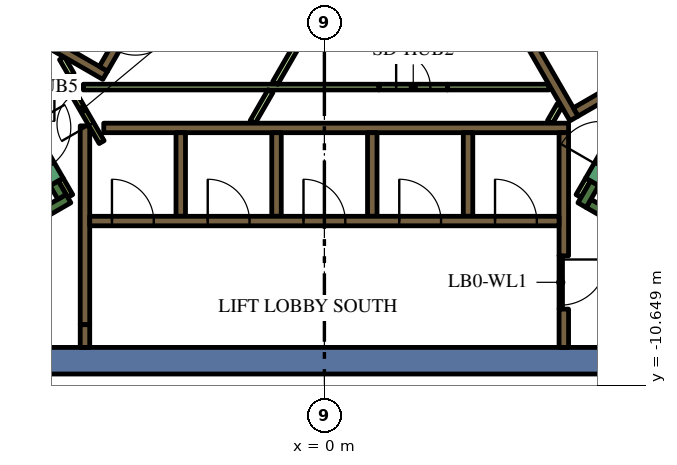
"""IFC4 building model, lengths in metres.
Left out: names, types, materials, properties, quantities, classifications, styles, units other than length and angle.
Written with IfcOpenShell. Run it as: python <this file> out.ifc"""

import sys

from ifc_helpers import new_model, si_unit, direction, frame, frame_2d, origin, place, context, subcontext, project, spatial, polyline, rectangle, outline, extrude, element, fill, save


model = new_model("IFC4")
c1 = context("Model", 3, precision=1e-05, world=origin(), true_north=direction((0.0, 1.0)))
c2 = subcontext(c1, "Body", "Model", "MODEL_VIEW")
j1 = project(units=[si_unit("LENGTHUNIT", "METRE"), si_unit("PLANEANGLEUNIT", "RADIAN")], contexts=[c1])
p1 = place(None, origin())
s1 = spatial("IfcSite", under=j1, at=p1, CompositionType="ELEMENT")
p2 = place(p1, origin())
s2 = spatial("IfcBuilding", under=s1, at=p2, CompositionType="ELEMENT")
p3 = place(p2, frame((0.0, 0.0, 205.8)))
s3 = spatial("IfcBuildingStorey", under=s2, at=p3, CompositionType="ELEMENT", Elevation=205.8)
p4 = place(p3, frame((-10.556, -10.0, 0.0), z_axis=(0.0, 0.0, 1.0), x_axis=(1.0, 0.0, 0.0)))
e1 = element("IfcWall", 1, at=p4, inside=s3, PredefinedType="SOLIDWALL", context=c2, shape_type="SweptSolid", body=[
    extrude(rectangle(XDim=19.461, YDim=0.7, at=frame_2d((9.73, 0.0))), origin(), (0.0, 0.0, 1.0), 4.2),
])
p5 = place(p3, frame((12.84, -9.261, 0.0), z_axis=(0.0, 0.0, 1.0), x_axis=(-0.866013990052, 0.500019768644, 0.0)))
e2 = element("IfcWall", 2, at=p5, inside=s3, PredefinedType="SOLIDWALL", context=c2, shape_type="SweptSolid", body=[
    extrude(rectangle(XDim=6.8, YDim=0.25, at=frame_2d((3.4, 0.0))), origin(), (0.0, 0.0, 1.0), 4.2),
])
p6 = place(p3, frame((7.113, -5.33, 0.0), z_axis=(0.0, 0.0, 1.0), x_axis=(-0.499965889992, -0.866045096311, 0.0)))
e3 = element("IfcWall", 3, at=p6, inside=s3, PredefinedType="SOLIDWALL", context=c2, shape_type="SweptSolid", body=[
    extrude(rectangle(XDim=0.666, YDim=0.25, at=frame_2d((0.333, 0.0))), origin(), (0.0, 0.0, 1.0), 4.2),
])
p7 = place(p3, frame((-12.84, -9.261, 0.0), z_axis=(0.0, 0.0, 1.0), x_axis=(0.866016039709, 0.500016218704, 0.0)))
e4 = element("IfcWall", 4, at=p7, inside=s3, PredefinedType="SOLIDWALL", context=c2, shape_type="SweptSolid", body=[
    extrude(rectangle(XDim=7.05, YDim=0.25, at=frame_2d((3.525, 0.0))), origin(), (0.0, 0.0, 1.0), 4.2),
])
p8 = place(p3, frame((-6.905, -5.69, 0.0), z_axis=(0.0, 0.0, 1.0), x_axis=(-0.499993700073, 0.866029041019, 0.0)))
e5 = element("IfcWall", 5, at=p8, inside=s3, PredefinedType="SOLIDWALL", context=c2, shape_type="SweptSolid", body=[
    extrude(rectangle(XDim=0.416, YDim=0.25, at=frame_2d((0.208, 0.0))), origin(), (0.0, 0.0, 1.0), 4.2),
])
p9 = place(p3, frame((-6.3, -9.05, 0.0), z_axis=(0.0, 0.0, 1.0), x_axis=(0.0, 1.0, 0.0)))
e6 = element("IfcWall", 6, at=p9, inside=s3, PredefinedType="SOLIDWALL", context=c2, shape_type="SweptSolid", body=[
    extrude(rectangle(XDim=5.23, YDim=0.25, at=frame_2d((2.615, 0.0))), origin(), (0.0, 0.0, 1.0), 4.2),
])
p10 = place(p3, frame((-6.3, -9.052, 0.0), z_axis=(0.0, 0.0, 1.0), x_axis=(0.0, -1.0, 0.0)))
e7 = element("IfcWall", 7, at=p10, inside=s3, PredefinedType="SOLIDWALL", context=c2, shape_type="SweptSolid", body=[
    extrude(rectangle(XDim=0.598, YDim=0.25, at=frame_2d((0.299, 0.0))), origin(), (0.0, 0.0, 1.0), 4.2),
])
p11 = place(p3, frame((-5.806, -3.875, 0.0), z_axis=(0.0, 0.0, 1.0), x_axis=(1.0, 0.0, 0.0)))
e8 = element("IfcWall", 8, at=p11, inside=s3, PredefinedType="SOLIDWALL", context=c2, shape_type="SweptSolid", body=[
    extrude(rectangle(XDim=12.231, YDim=0.25, at=frame_2d((6.116, 0.0))), origin(), (0.0, 0.0, 1.0), 4.2),
])
p12 = place(p3, frame((6.3, -7.24, 0.0), z_axis=(0.0, 0.0, 1.0), x_axis=(0.0, 1.0, 0.0)))
e9 = element("IfcWall", 9, at=p12, inside=s3, PredefinedType="SOLIDWALL", context=c2, shape_type="SweptSolid", body=[
    extrude(rectangle(XDim=3.24, YDim=0.25, at=frame_2d((1.62, 0.0))), origin(), (0.0, 0.0, 1.0), 4.2),
])
p13 = place(p3, frame((6.3, -9.65, 0.0), z_axis=(0.0, 0.0, 1.0), x_axis=(0.0, 1.0, 0.0)))
e10 = element("IfcWall", 10, at=p13, inside=s3, PredefinedType="SOLIDWALL", context=c2, shape_type="SweptSolid", body=[
    extrude(rectangle(XDim=1.008, YDim=0.25, at=frame_2d((0.504, 0.0))), origin(), (0.0, 0.0, 1.0), 4.2),
])
for number, where, z_axis, x_axis in (
    (11, (3.78, -4.0, 0.0), (0.0, 0.0, 1.0), (0.0, -1.0, 0.0)),
    (12, (1.26, -4.0, 0.0), (0.0, 0.0, 1.0), (0.0, -1.0, 0.0)),
    (13, (-1.26, -4.0, 0.0), (0.0, 0.0, 1.0), (0.0, -1.0, 0.0)),
    (14, (-3.78, -4.0, 0.0), (0.0, 0.0, 1.0), (0.0, -1.0, 0.0)),
):
    element("IfcWall", number, at=place(p3, frame(where, z_axis=z_axis, x_axis=x_axis)), inside=s3, PredefinedType="SOLIDWALL", context=c2, shape_type="SweptSolid", body=[
        extrude(rectangle(XDim=2.2, YDim=0.25, at=frame_2d((1.1, 0.0))), origin(), (0.0, 0.0, 1.0), 4.2),
    ])
p14 = place(p3, origin())
e15 = element("IfcWall", 15, at=p14, inside=s3, PredefinedType="SOLIDWALL", context=c2, shape_type="SweptSolid", body=[
    extrude(outline(polyline([(0.332, 6.925), (0.335, 6.925), (0.335, 6.925), (0.335, 6.925), (0.335, 7.075), (0.335, 7.075), (0.335, 7.075), (0.245, 7.075), (0.035, 7.439), (0.252, 7.564), (0.377, 7.348), (1.512, 5.382), (1.637, 5.165), (2.221, 4.153), (2.771, 3.199), (2.896, 2.983), (3.138, 2.564), (4.031, 1.017), (4.156, 0.801), (5.292, -1.165), (5.417, -1.382), (6.073, -2.519), (6.552, -3.348), (6.677, -3.564), (6.46, -3.689), (0.332, 6.925)])), origin(), (0.0, 0.0, 1.0), 4.2),
])
p15 = place(p3, frame((11.507, -0.631, 0.0), z_axis=(0.0, 0.0, 1.0), x_axis=(-0.866011447264, -0.500024172624, 0.0)))
e16 = element("IfcWall", 16, at=p15, inside=s3, PredefinedType="SOLIDWALL", context=c2, shape_type="SweptSolid", body=[
    extrude(rectangle(XDim=5.65, YDim=0.25, at=frame_2d((2.825, 0.0))), origin(), (0.0, 0.0, 1.0), 4.2),
])
p16 = place(p3, frame((-7.889, -1.265, 0.0), z_axis=(0.0, 0.0, 1.0), x_axis=(0.866057815567, -0.499943856944, 0.0)))
e17 = element("IfcWall", 17, at=p16, inside=s3, PredefinedType="SOLIDWALL", context=c2, shape_type="SweptSolid", body=[
    extrude(rectangle(XDim=2.45, YDim=0.25, at=frame_2d((1.225, 0.0))), origin(), (0.0, 0.0, 1.0), 4.2),
])
p17 = place(p3, frame((1.438, -2.8, 0.0), z_axis=(0.0, 0.0, 1.0), x_axis=(-1.0, 0.0, 0.0)))
e18 = element("IfcWall", 18, at=p17, inside=s3, PredefinedType="PARTITIONING", context=c2, shape_type="SweptSolid", body=[
    extrude(rectangle(XDim=7.781, YDim=0.15, at=frame_2d((3.891, 0.0))), origin(), (0.0, 0.0, 1.0), 3.45),
])
p18 = place(p3, frame((-1.418, -2.907, 0.0), z_axis=(0.0, 0.0, 1.0), x_axis=(-0.499978056798, -0.866038072327, 0.0)))
e19 = element("IfcWall", 19, at=p18, inside=s3, PredefinedType="PARTITIONING", context=c2, shape_type="SweptSolid", body=[
    extrude(rectangle(XDim=0.937, YDim=0.15, at=frame_2d((0.469, 0.0))), origin(), (0.0, 0.0, 1.0), 3.45),
])
for number, where, z_axis, x_axis in (
    (20, (-1.295, -2.693, 0.0), (0.0, 0.0, 1.0), (0.5, 0.866, 0.0)),
    (21, (3.238, -2.8, 0.0), (0.0, 0.0, 1.0), (1.0, 0.0, 0.0)),
):
    element("IfcWall", number, at=place(p3, frame(where, z_axis=z_axis, x_axis=x_axis)), inside=s3, PredefinedType="PARTITIONING", context=c2, shape_type="SweptSolid", body=[
        extrude(rectangle(XDim=2.672, YDim=0.15, at=frame_2d((1.336, 0.0))), origin(), (0.0, 0.0, 1.0), 3.45),
    ])
p19 = place(p3, frame((-6.653, -2.477, 0.0), z_axis=(0.0, 0.0, 1.0), x_axis=(-0.500002592159, 0.866023907196, 0.0)))
e22 = element("IfcWall", 22, at=p19, inside=s3, PredefinedType="PARTITIONING", context=c2, shape_type="SweptSolid", body=[
    extrude(rectangle(XDim=0.503, YDim=0.15, at=frame_2d((0.251, 0.0))), origin(), (0.0, 0.0, 1.0), 3.45),
])
p20 = place(p3, frame((-6.94, -5.23, 0.0), z_axis=(0.0, 0.0, 1.0), x_axis=(0.499834152157, -0.86612113491, 0.0)))
e23 = element("IfcWall", 23, at=p20, inside=s3, PredefinedType="PARTITIONING", context=c2, shape_type="SweptSolid", body=[
    extrude(rectangle(XDim=0.505, YDim=0.15, at=frame_2d((0.252, 0.0))), origin(), (0.0, 0.0, 1.0), 4.2),
])
p21 = place(p3, frame((6.688, -5.667, 0.0), z_axis=(0.0, 0.0, 1.0), x_axis=(0.499834152157, 0.86612113491, 0.0)))
e24 = element("IfcWall", 24, at=p21, inside=s3, PredefinedType="PARTITIONING", context=c2, shape_type="SweptSolid", body=[
    extrude(rectangle(XDim=0.505, YDim=0.15, at=frame_2d((0.252, 0.0))), origin(), (0.0, 0.0, 1.0), 3.45),
])
p22 = place(p3, frame((5.936, -3.718, 0.0), z_axis=(0.0, 0.0, 1.0), x_axis=(0.499890179513, 0.866088799389, 0.0)))
e25 = element("IfcWall", 25, at=p22, inside=s3, PredefinedType="PARTITIONING", context=c2, shape_type="SweptSolid", body=[
    extrude(rectangle(XDim=0.504, YDim=0.15, at=frame_2d((0.252, 0.0))), origin(), (0.0, 0.0, 1.0), 3.45),
])
p23 = place(p3, frame((-6.175, -6.325, 0.0), z_axis=(0.0, 0.0, 1.0), x_axis=(1.0, 0.0, 0.0)))
e26 = element("IfcWall", 26, at=p23, inside=s3, PredefinedType="SOLIDWALL", context=c2, shape_type="SweptSolid", body=[
    extrude(rectangle(XDim=12.35, YDim=0.25, at=frame_2d((6.175, 0.0))), origin(), (0.0, 0.0, 1.0), 4.2),
])
p24 = place(p23, frame((0.585, 0.0, 0.0)))
e27 = element("IfcOpeningElement", 27, at=p24, cuts=e26, PredefinedType="OPENING", context=c2, shape_type="SweptSolid", body=[
    extrude(rectangle(XDim=1.1, YDim=2.1, at=frame_2d((0.55, 1.05))), frame((0.0, 0.135, 0.0), z_axis=(0.0, -1.0, 0.0), x_axis=(1.0, 0.0, 0.0)), (0.0, 0.0, 1.0), 0.27),
])
p25 = place(p23, frame((3.105, 0.0, 0.0)))
e28 = element("IfcOpeningElement", 28, at=p25, cuts=e26, PredefinedType="OPENING", context=c2, shape_type="SweptSolid", body=[
    extrude(rectangle(XDim=1.1, YDim=2.1, at=frame_2d((0.55, 1.05))), frame((0.0, 0.135, 0.0), z_axis=(0.0, -1.0, 0.0), x_axis=(1.0, 0.0, 0.0)), (0.0, 0.0, 1.0), 0.27),
])
p26 = place(p23, frame((5.625, 0.0, 0.0)))
e29 = element("IfcOpeningElement", 29, at=p26, cuts=e26, PredefinedType="OPENING", context=c2, shape_type="SweptSolid", body=[
    extrude(rectangle(XDim=1.1, YDim=2.1, at=frame_2d((0.55, 1.05))), frame((0.0, 0.135, 0.0), z_axis=(0.0, -1.0, 0.0), x_axis=(1.0, 0.0, 0.0)), (0.0, 0.0, 1.0), 0.27),
])
p27 = place(p23, frame((8.145, 0.0, 0.0)))
e30 = element("IfcOpeningElement", 30, at=p27, cuts=e26, PredefinedType="OPENING", context=c2, shape_type="SweptSolid", body=[
    extrude(rectangle(XDim=1.1, YDim=2.1, at=frame_2d((0.55, 1.05))), frame((0.0, 0.135, 0.0), z_axis=(0.0, -1.0, 0.0), x_axis=(1.0, 0.0, 0.0)), (0.0, 0.0, 1.0), 0.27),
])
p28 = place(p23, frame((10.665, 0.0, 0.0)))
e31 = element("IfcOpeningElement", 31, at=p28, cuts=e26, PredefinedType="OPENING", context=c2, shape_type="SweptSolid", body=[
    extrude(rectangle(XDim=1.1, YDim=2.1, at=frame_2d((0.55, 1.05))), frame((0.0, 0.135, 0.0), z_axis=(0.0, -1.0, 0.0), x_axis=(1.0, 0.0, 0.0)), (0.0, 0.0, 1.0), 0.27),
])
p29 = place(p3, frame((8.565, -2.185, 0.0), z_axis=(0.0, 0.0, 1.0), x_axis=(-0.499997954832, 0.866026584559, 0.0)))
e32 = element("IfcWall", 32, at=p29, inside=s3, PredefinedType="SOLIDWALL", context=c2, shape_type="SweptSolid", body=[
    extrude(rectangle(XDim=12.35, YDim=0.25, at=frame_2d((6.175, 0.0))), origin(), (0.0, 0.0, 1.0), 4.2),
])
p30 = place(p29, frame((0.585, 0.0, 0.0)))
e33 = element("IfcOpeningElement", 33, at=p30, cuts=e32, PredefinedType="OPENING", context=c2, shape_type="SweptSolid", body=[
    extrude(rectangle(XDim=1.1, YDim=2.1, at=frame_2d((0.55, 1.05))), frame((0.0, 0.135, 0.0), z_axis=(0.0, -1.0, 0.0), x_axis=(1.0, 0.0, 0.0)), (0.0, 0.0, 1.0), 0.27),
])
p31 = place(p3, frame((-0.898, 6.194, 0.0), z_axis=(0.0, 0.0, 1.0), x_axis=(-0.499996202215, -0.866027596426, 0.0)))
e34 = element("IfcWall", 34, at=p31, inside=s3, PredefinedType="SOLIDWALL", context=c2, shape_type="SweptSolid", body=[
    extrude(rectangle(XDim=9.83, YDim=0.25, at=frame_2d((4.915, 0.0))), origin(), (0.0, 0.0, 1.0), 4.2),
])
p32 = place(p31, frame((0.585, 0.0, 0.0)))
e35 = element("IfcOpeningElement", 35, at=p32, cuts=e34, PredefinedType="OPENING", context=c2, shape_type="SweptSolid", body=[
    extrude(rectangle(XDim=1.1, YDim=2.1, at=frame_2d((0.55, 1.05))), frame((0.0, 0.135, 0.0), z_axis=(0.0, -1.0, 0.0), x_axis=(1.0, 0.0, 0.0)), (0.0, 0.0, 1.0), 0.27),
])
p33 = place(p31, frame((3.105, 0.0, 0.0)))
e36 = element("IfcOpeningElement", 36, at=p33, cuts=e34, PredefinedType="OPENING", context=c2, shape_type="SweptSolid", body=[
    extrude(rectangle(XDim=1.1, YDim=2.1, at=frame_2d((0.55, 1.05))), frame((0.0, 0.135, 0.0), z_axis=(0.0, -1.0, 0.0), x_axis=(1.0, 0.0, 0.0)), (0.0, 0.0, 1.0), 0.27),
])
p34 = place(p31, frame((5.625, 0.0, 0.0)))
e37 = element("IfcOpeningElement", 37, at=p34, cuts=e34, PredefinedType="OPENING", context=c2, shape_type="SweptSolid", body=[
    extrude(rectangle(XDim=1.1, YDim=2.1, at=frame_2d((0.55, 1.05))), frame((0.0, 0.135, 0.0), z_axis=(0.0, -1.0, 0.0), x_axis=(1.0, 0.0, 0.0)), (0.0, 0.0, 1.0), 0.27),
])
p35 = place(p31, frame((8.145, 0.0, 0.0)))
e38 = element("IfcOpeningElement", 38, at=p35, cuts=e34, PredefinedType="OPENING", context=c2, shape_type="SweptSolid", body=[
    extrude(rectangle(XDim=1.1, YDim=2.1, at=frame_2d((0.55, 1.05))), frame((0.0, 0.135, 0.0), z_axis=(0.0, -1.0, 0.0), x_axis=(1.0, 0.0, 0.0)), (0.0, 0.0, 1.0), 0.27),
])
p36 = place(p3, frame((7.048, -5.292, 0.0), z_axis=(0.0, 0.0, 1.0), x_axis=(0.49994051562, 0.866059744384, 0.0)))
e39 = element("IfcWall", 39, at=p36, inside=s3, PredefinedType="SOLIDWALL", context=c2, shape_type="SweptSolid", body=[
    extrude(rectangle(XDim=2.1, YDim=0.4, at=frame_2d((1.05, 0.0))), origin(), (0.0, 0.0, 1.0), 4.2),
])
p37 = place(p36, frame((0.45, 0.0, 0.0)))
e40 = element("IfcOpeningElement", 40, at=p37, cuts=e39, PredefinedType="OPENING", context=c2, shape_type="SweptSolid", body=[
    extrude(rectangle(XDim=1.2, YDim=2.1, at=frame_2d((0.6, 1.05))), frame((0.0, 0.21, 0.0), z_axis=(0.0, -1.0, 0.0), x_axis=(1.0, 0.0, 0.0)), (0.0, 0.0, 1.0), 0.42),
])
p38 = place(p3, frame((-8.098, -3.474, 0.0), z_axis=(0.0, 0.0, 1.0), x_axis=(0.49994051562, -0.866059744384, 0.0)))
e41 = element("IfcWall", 41, at=p38, inside=s3, PredefinedType="SOLIDWALL", context=c2, shape_type="SweptSolid", body=[
    extrude(rectangle(XDim=2.1, YDim=0.4, at=frame_2d((1.05, 0.0))), origin(), (0.0, 0.0, 1.0), 4.2),
])
p39 = place(p38, frame((0.45, 0.0, 0.0)))
e42 = element("IfcOpeningElement", 42, at=p39, cuts=e41, PredefinedType="OPENING", context=c2, shape_type="SweptSolid", body=[
    extrude(rectangle(XDim=1.2, YDim=2.1, at=frame_2d((0.6, 1.05))), frame((0.0, 0.21, 0.0), z_axis=(0.0, -1.0, 0.0), x_axis=(1.0, 0.0, 0.0)), (0.0, 0.0, 1.0), 0.42),
])
p40 = place(p3, frame((-5.861, -4.248, 0.0), z_axis=(0.0, 0.0, 1.0), x_axis=(-0.500043646338, 0.866000203093, 0.0)))
e43 = element("IfcWall", 43, at=p40, inside=s3, PredefinedType="PARTITIONING", context=c2, shape_type="SweptSolid", body=[
    extrude(rectangle(XDim=1.93, YDim=0.15, at=frame_2d((0.965, 0.0))), origin(), (0.0, 0.0, 1.0), 4.2),
])
p41 = place(p40, frame((0.55, 0.0, 0.0)))
e44 = element("IfcOpeningElement", 44, at=p41, cuts=e43, PredefinedType="OPENING", context=c2, shape_type="SweptSolid", body=[
    extrude(rectangle(XDim=0.9, YDim=2.1, at=frame_2d((0.45, 1.05))), frame((0.0, 0.085, 0.0), z_axis=(0.0, -1.0, 0.0), x_axis=(1.0, 0.0, 0.0)), (0.0, 0.0, 1.0), 0.17),
])
p42 = place(p3, frame((6.22, -7.237, 0.0), z_axis=(0.0, 0.0, 1.0), x_axis=(0.0, -1.0, 0.0)))
e45 = element("IfcWall", 45, at=p42, inside=s3, PredefinedType="PARTITIONING", context=c2, shape_type="SweptSolid", body=[
    extrude(rectangle(XDim=1.4, YDim=0.09, at=frame_2d((0.7, 0.0))), origin(), (0.0, 0.0, 1.0), 3.45),
])
p43 = place(p42, frame((0.1, 0.0, 0.0)))
e46 = element("IfcOpeningElement", 46, at=p43, cuts=e45, PredefinedType="OPENING", context=c2, shape_type="SweptSolid", body=[
    extrude(rectangle(XDim=1.2, YDim=2.1, at=frame_2d((0.6, 1.05))), frame((0.0, 0.055, 0.0), z_axis=(0.0, -1.0, 0.0), x_axis=(1.0, 0.0, 0.0)), (0.0, 0.0, 1.0), 0.11),
])
p44 = place(p3, frame((1.438, -2.8, 0.0), z_axis=(0.0, 0.0, 1.0), x_axis=(1.0, 0.0, 0.0)))
e47 = element("IfcWall", 47, at=p44, inside=s3, PredefinedType="PARTITIONING", context=c2, shape_type="SweptSolid", body=[
    extrude(rectangle(XDim=1.8, YDim=0.15, at=frame_2d((0.9, 0.0))), origin(), (0.0, 0.0, 1.0), 3.45),
])
p45 = place(p44, frame((0.45, 0.0, 0.0)))
e48 = element("IfcOpeningElement", 48, at=p45, cuts=e47, PredefinedType="OPENING", context=c2, shape_type="SweptSolid", body=[
    extrude(rectangle(XDim=0.9, YDim=2.1, at=frame_2d((0.45, 1.05))), frame((0.0, 0.085, 0.0), z_axis=(0.0, -1.0, 0.0), x_axis=(1.0, 0.0, 0.0)), (0.0, 0.0, 1.0), 0.17),
])
p46 = place(p3, frame((-6.655, -2.8, 0.0), z_axis=(0.0, 0.0, 1.0), x_axis=(-1.0, 0.0, 0.0)))
e49 = element("IfcWall", 49, at=p46, inside=s3, PredefinedType="PARTITIONING", context=c2, shape_type="SweptSolid", body=[
    extrude(rectangle(XDim=1.8, YDim=0.15, at=frame_2d((0.9, 0.0))), origin(), (0.0, 0.0, 1.0), 3.45),
])
p47 = place(p46, frame((0.45, 0.0, 0.0)))
e50 = element("IfcOpeningElement", 50, at=p47, cuts=e49, PredefinedType="OPENING", context=c2, shape_type="SweptSolid", body=[
    extrude(rectangle(XDim=0.9, YDim=2.1, at=frame_2d((0.45, 1.05))), frame((0.0, 0.085, 0.0), z_axis=(0.0, -1.0, 0.0), x_axis=(1.0, 0.0, 0.0)), (0.0, 0.0, 1.0), 0.17),
])
p48 = place(p24, origin())
e51 = element("IfcDoor", 51, at=p48, inside=s3, OperationType="DOUBLE_DOOR_SLIDING", PredefinedType="DOOR", context=c2, shape_type="SweptSolid", body=[
    extrude(rectangle(XDim=1.1, YDim=2.1, at=frame_2d((0.55, 1.05))), frame((0.0, 0.025, 0.0), z_axis=(0.0, -1.0, 0.0), x_axis=(1.0, 0.0, 0.0)), (0.0, 0.0, 1.0), 0.05),
])
fill(e27, e51)
p49 = place(p25, origin())
e52 = element("IfcDoor", 52, at=p49, inside=s3, OperationType="DOUBLE_DOOR_SLIDING", PredefinedType="DOOR", context=c2, shape_type="SweptSolid", body=[
    extrude(rectangle(XDim=1.1, YDim=2.1, at=frame_2d((0.55, 1.05))), frame((0.0, 0.025, 0.0), z_axis=(0.0, -1.0, 0.0), x_axis=(1.0, 0.0, 0.0)), (0.0, 0.0, 1.0), 0.05),
])
fill(e28, e52)
p50 = place(p26, origin())
e53 = element("IfcDoor", 53, at=p50, inside=s3, OperationType="DOUBLE_DOOR_SLIDING", PredefinedType="DOOR", context=c2, shape_type="SweptSolid", body=[
    extrude(rectangle(XDim=1.1, YDim=2.1, at=frame_2d((0.55, 1.05))), frame((0.0, 0.025, 0.0), z_axis=(0.0, -1.0, 0.0), x_axis=(1.0, 0.0, 0.0)), (0.0, 0.0, 1.0), 0.05),
])
fill(e29, e53)
p51 = place(p27, origin())
e54 = element("IfcDoor", 54, at=p51, inside=s3, OperationType="DOUBLE_DOOR_SLIDING", PredefinedType="DOOR", context=c2, shape_type="SweptSolid", body=[
    extrude(rectangle(XDim=1.1, YDim=2.1, at=frame_2d((0.55, 1.05))), frame((0.0, 0.025, 0.0), z_axis=(0.0, -1.0, 0.0), x_axis=(1.0, 0.0, 0.0)), (0.0, 0.0, 1.0), 0.05),
])
fill(e30, e54)
p52 = place(p28, origin())
e55 = element("IfcDoor", 55, at=p52, inside=s3, OperationType="DOUBLE_DOOR_SLIDING", PredefinedType="DOOR", context=c2, shape_type="SweptSolid", body=[
    extrude(rectangle(XDim=1.1, YDim=2.1, at=frame_2d((0.55, 1.05))), frame((0.0, 0.025, 0.0), z_axis=(0.0, -1.0, 0.0), x_axis=(1.0, 0.0, 0.0)), (0.0, 0.0, 1.0), 0.05),
])
fill(e31, e55)
p53 = place(p41, origin())
e56 = element("IfcDoor", 56, at=p53, inside=s3, OperationType="SINGLE_SWING_LEFT", PredefinedType="DOOR", context=c2, shape_type="SweptSolid", body=[
    extrude(rectangle(XDim=0.9, YDim=2.1, at=frame_2d((0.45, 1.05))), frame((0.0, 0.025, 0.0), z_axis=(0.0, -1.0, 0.0), x_axis=(1.0, 0.0, 0.0)), (0.0, 0.0, 1.0), 0.05),
])
fill(e44, e56)
p54 = place(p43, origin())
e57 = element("IfcDoor", 57, at=p54, inside=s3, OperationType="SINGLE_SWING_LEFT", PredefinedType="DOOR", context=c2, shape_type="SweptSolid", body=[
    extrude(rectangle(XDim=1.2, YDim=2.1, at=frame_2d((0.6, 1.05))), frame((0.0, 0.025, 0.0), z_axis=(0.0, -1.0, 0.0), x_axis=(1.0, 0.0, 0.0)), (0.0, 0.0, 1.0), 0.05),
])
fill(e46, e57)
p55 = place(p45, origin())
e58 = element("IfcDoor", 58, at=p55, inside=s3, OperationType="SINGLE_SWING_LEFT", PredefinedType="DOOR", context=c2, shape_type="SweptSolid", body=[
    extrude(rectangle(XDim=0.9, YDim=2.1, at=frame_2d((0.45, 1.05))), frame((0.0, 0.025, 0.0), z_axis=(0.0, -1.0, 0.0), x_axis=(1.0, 0.0, 0.0)), (0.0, 0.0, 1.0), 0.05),
])
fill(e48, e58)
p56 = place(p47, origin())
e59 = element("IfcDoor", 59, at=p56, inside=s3, OperationType="SINGLE_SWING_LEFT", PredefinedType="DOOR", context=c2, shape_type="SweptSolid", body=[
    extrude(rectangle(XDim=0.9, YDim=2.1, at=frame_2d((0.45, 1.05))), frame((0.0, 0.025, 0.0), z_axis=(0.0, -1.0, 0.0), x_axis=(1.0, 0.0, 0.0)), (0.0, 0.0, 1.0), 0.05),
])
fill(e50, e59)
save(model, sys.argv[1])
